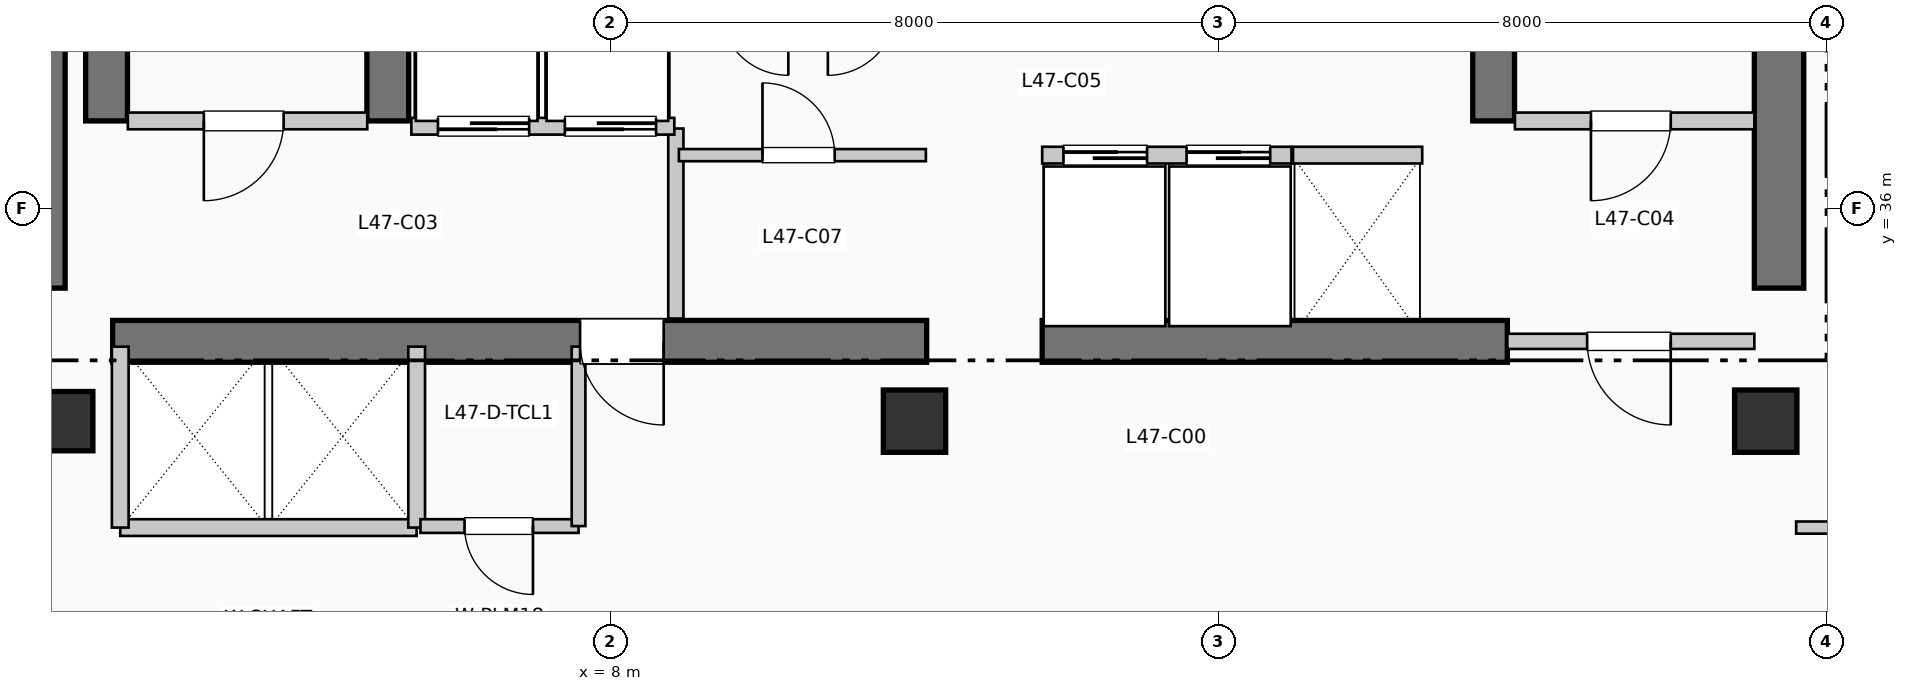
"""IFC4 building model, lengths in metres.
Left out: names, types, materials, properties, quantities, classifications, styles, units other than length and angle.
Written with IfcOpenShell. Run it as: python <this file> out.ifc"""

import sys

from ifc_helpers import new_model, si_unit, direction, frame, frame_2d, origin, origin_2d, place, context, subcontext, project, spatial, rectangle, extrude, element, fill, save


model = new_model("IFC4")
c1 = context("Model", 3, precision=1e-05, world=origin(), true_north=direction((0.0, 1.0)))
c2 = subcontext(c1, "Body", "Model", "MODEL_VIEW")
j1 = project(units=[si_unit("LENGTHUNIT", "METRE"), si_unit("PLANEANGLEUNIT", "RADIAN")], contexts=[c1])
p1 = place(None, origin())
s1 = spatial("IfcSite", under=j1, at=p1, CompositionType="ELEMENT")
p2 = place(p1, origin())
s2 = spatial("IfcBuilding", under=s1, at=p2, CompositionType="ELEMENT")
p3 = place(p2, frame((0.0, 0.0, 195.36)))
s3 = spatial("IfcBuildingStorey", under=s2, at=p3, CompositionType="ELEMENT", Elevation=195.36)
p4 = place(p3, frame((0.5, 34.95, 0.0), z_axis=(0.0, 0.0, 1.0), x_axis=(0.0, 1.0, 0.0)))
e1 = element("IfcWall", 1, at=p4, inside=s3, PredefinedType="SHEAR", context=c2, shape_type="SweptSolid", body=[
    extrude(rectangle(XDim=7.9, YDim=0.65, at=frame_2d((3.95, 0.0))), origin(), (0.0, 0.0, 1.0), 3.96),
])
p5 = place(p3, frame((23.375, 34.95, 0.0), z_axis=(0.0, 0.0, 1.0), x_axis=(0.0, 1.0, 0.0)))
e2 = element("IfcWall", 2, at=p5, inside=s3, PredefinedType="SHEAR", context=c2, shape_type="SweptSolid", body=[
    extrude(rectangle(XDim=10.64, YDim=0.65, at=frame_2d((5.32, 0.0))), origin(), (0.0, 0.0, 1.0), 3.96),
])
p6 = place(p3, frame((1.45, 34.25, 0.0), z_axis=(0.0, 0.0, 1.0), x_axis=(1.0, 0.0, 0.0)))
e3 = element("IfcWall", 3, at=p6, inside=s3, PredefinedType="SHEAR", context=c2, shape_type="SweptSolid", body=[
    extrude(rectangle(XDim=10.71, YDim=0.55, at=frame_2d((5.355, 0.0))), origin(), (0.0, 0.0, 1.0), 3.96),
])
p7 = place(p6, frame((7.25, 0.0, 0.0), z_axis=(0.0, 0.0, 1.0), x_axis=(-1.0, 0.0, 0.0)))
e4 = element("IfcOpeningElement", 4, at=p7, cuts=e3, PredefinedType="OPENING", context=c2, shape_type="SweptSolid", body=[
    extrude(rectangle(XDim=1.1, YDim=2.15, at=frame_2d((0.55, 1.075))), frame((0.0, 0.285, 0.0), z_axis=(0.0, -1.0, 0.0), x_axis=(1.0, 0.0, 0.0)), (0.0, 0.0, 1.0), 0.57),
])
p8 = place(p3, frame((13.68, 34.25, 0.0), z_axis=(0.0, 0.0, 1.0), x_axis=(1.0, 0.0, 0.0)))
e5 = element("IfcWall", 5, at=p8, inside=s3, PredefinedType="SHEAR", context=c2, shape_type="SweptSolid", body=[
    extrude(rectangle(XDim=6.12, YDim=0.55, at=frame_2d((3.06, 0.0))), origin(), (0.0, 0.0, 1.0), 3.96),
])
for number, where, z_axis, x_axis in (
    (6, (1.37, 37.15, 0.0), (0.0, 0.0, 1.0), (0.0, 1.0, 0.0)),
    (7, (5.07, 37.15, 0.0), (0.0, 0.0, 1.0), (0.0, 1.0, 0.0)),
    (8, (19.62, 37.15, 0.0), (0.0, 0.0, 1.0), (0.0, 1.0, 0.0)),
):
    element("IfcWall", number, at=place(p3, frame(where, z_axis=z_axis, x_axis=x_axis)), inside=s3, PredefinedType="SHEAR", context=c2, shape_type="SweptSolid", body=[
        extrude(rectangle(XDim=7.89, YDim=0.55, at=frame_2d((3.945, 0.0))), origin(), (0.0, 0.0, 1.0), 3.96),
    ])
p9 = place(p3, frame((0.8, 33.2, 0.0), z_axis=(0.0, 0.0, 1.0), x_axis=(1.0, 0.0, 0.0)))
e9 = element("IfcColumn", 9, at=p9, inside=s3, PredefinedType="COLUMN", context=c2, shape_type="SweptSolid", body=[
    extrude(rectangle(XDim=0.78, YDim=0.78, at=origin_2d()), origin(), (0.0, 0.0, 1.0), 3.96),
])
for number, where, z_axis, x_axis in (
    (10, (12.0, 33.2, 0.0), (0.0, 0.0, 1.0), (1.0, 0.0, 0.0)),
    (11, (23.2, 33.2, 0.0), (0.0, 0.0, 1.0), (1.0, 0.0, 0.0)),
):
    element("IfcColumn", number, at=place(p3, frame(where, z_axis=z_axis, x_axis=x_axis)), inside=s3, PredefinedType="COLUMN", context=c2, shape_type="SweptSolid", body=[
        extrude(rectangle(XDim=0.82, YDim=0.82, at=origin_2d()), origin(), (0.0, 0.0, 1.0), 3.96),
    ])
p10 = place(p3, frame((1.65, 37.15, 0.0), z_axis=(0.0, 0.0, 1.0), x_axis=(1.0, 0.0, 0.0)))
e12 = element("IfcWall", 12, at=p10, inside=s3, PredefinedType="PARTITIONING", context=c2, shape_type="SweptSolid", body=[
    extrude(rectangle(XDim=3.15, YDim=0.22, at=frame_2d((1.575, 0.0))), origin(), (0.0, 0.0, 1.0), 3.71),
])
p11 = place(p10, frame((2.05, 0.0, 0.0), z_axis=(0.0, 0.0, 1.0), x_axis=(-1.0, 0.0, 0.0)))
e13 = element("IfcOpeningElement", 13, at=p11, cuts=e12, PredefinedType="OPENING", context=c2, shape_type="SweptSolid", body=[
    extrude(rectangle(XDim=1.05, YDim=2.15, at=frame_2d((0.525, 1.075))), frame((0.0, 0.12, 0.0), z_axis=(0.0, -1.0, 0.0), x_axis=(1.0, 0.0, 0.0)), (0.0, 0.0, 1.0), 0.24),
])
p12 = place(p3, frame((8.86, 34.55, 0.0), z_axis=(0.0, 0.0, 1.0), x_axis=(0.0, 1.0, 0.0)))
e14 = element("IfcWall", 14, at=p12, inside=s3, PredefinedType="PARTITIONING", context=c2, shape_type="SweptSolid", body=[
    extrude(rectangle(XDim=2.5, YDim=0.2, at=frame_2d((1.25, 0.0))), origin(), (0.0, 0.0, 1.0), 3.71),
])
p13 = place(p3, frame((19.9, 37.15, 0.0), z_axis=(0.0, 0.0, 1.0), x_axis=(1.0, 0.0, 0.0)))
e15 = element("IfcWall", 15, at=p13, inside=s3, PredefinedType="PARTITIONING", context=c2, shape_type="SweptSolid", body=[
    extrude(rectangle(XDim=3.15, YDim=0.22, at=frame_2d((1.575, 0.0))), origin(), (0.0, 0.0, 1.0), 3.71),
])
p14 = place(p13, frame((2.05, 0.0, 0.0), z_axis=(0.0, 0.0, 1.0), x_axis=(-1.0, 0.0, 0.0)))
e16 = element("IfcOpeningElement", 16, at=p14, cuts=e15, PredefinedType="OPENING", context=c2, shape_type="SweptSolid", body=[
    extrude(rectangle(XDim=1.05, YDim=2.15, at=frame_2d((0.525, 1.075))), frame((0.0, 0.12, 0.0), z_axis=(0.0, -1.0, 0.0), x_axis=(1.0, 0.0, 0.0)), (0.0, 0.0, 1.0), 0.24),
])
p15 = place(p3, frame((19.8, 34.25, 0.0), z_axis=(0.0, 0.0, 1.0), x_axis=(1.0, 0.0, 0.0)))
e17 = element("IfcWall", 17, at=p15, inside=s3, PredefinedType="PARTITIONING", context=c2, shape_type="SweptSolid", body=[
    extrude(rectangle(XDim=3.25, YDim=0.2, at=frame_2d((1.625, 0.0))), origin(), (0.0, 0.0, 1.0), 3.71),
])
p16 = place(p15, frame((2.15, 0.0, 0.0), z_axis=(0.0, 0.0, 1.0), x_axis=(-1.0, 0.0, 0.0)))
e18 = element("IfcOpeningElement", 18, at=p16, cuts=e17, PredefinedType="OPENING", context=c2, shape_type="SweptSolid", body=[
    extrude(rectangle(XDim=1.1, YDim=2.15, at=frame_2d((0.55, 1.075))), frame((0.0, 0.11, 0.0), z_axis=(0.0, -1.0, 0.0), x_axis=(1.0, 0.0, 0.0)), (0.0, 0.0, 1.0), 0.22),
])
p17 = place(p3, frame((5.38, 37.08, 0.0), z_axis=(0.0, 0.0, 1.0), x_axis=(1.0, 0.0, 0.0)))
e19 = element("IfcWall", 19, at=p17, inside=s3, PredefinedType="PARTITIONING", context=c2, shape_type="SweptSolid", body=[
    extrude(rectangle(XDim=3.46, YDim=0.22, at=frame_2d((1.73, 0.0))), origin(), (0.0, 0.0, 1.0), 3.71),
])
p18 = place(p17, frame((1.55, 0.0, 0.0), z_axis=(0.0, 0.0, 1.0), x_axis=(-1.0, 0.0, 0.0)))
e20 = element("IfcOpeningElement", 20, at=p18, cuts=e19, PredefinedType="OPENING", context=c2, shape_type="SweptSolid", body=[
    extrude(rectangle(XDim=1.2, YDim=2.2, at=frame_2d((0.6, 1.1))), frame((0.0, 0.12, 0.0), z_axis=(0.0, -1.0, 0.0), x_axis=(1.0, 0.0, 0.0)), (0.0, 0.0, 1.0), 0.24),
])
p19 = place(p17, frame((3.22, 0.0, 0.0), z_axis=(0.0, 0.0, 1.0), x_axis=(-1.0, 0.0, 0.0)))
e21 = element("IfcOpeningElement", 21, at=p19, cuts=e19, PredefinedType="OPENING", context=c2, shape_type="SweptSolid", body=[
    extrude(rectangle(XDim=1.2, YDim=2.2, at=frame_2d((0.6, 1.1))), frame((0.0, 0.12, 0.0), z_axis=(0.0, -1.0, 0.0), x_axis=(1.0, 0.0, 0.0)), (0.0, 0.0, 1.0), 0.24),
])
p20 = place(p3, frame((1.55, 31.8, 0.0), z_axis=(0.0, 0.0, 1.0), x_axis=(1.0, 0.0, 0.0)))
e22 = element("IfcWall", 22, at=p20, inside=s3, PredefinedType="PARTITIONING", context=c2, shape_type="SweptSolid", body=[
    extrude(rectangle(XDim=3.9, YDim=0.22, at=frame_2d((1.95, 0.0))), origin(), (0.0, 0.0, 1.0), 3.71),
])
for number, where, z_axis, x_axis in (
    (23, (1.55, 31.8, 0.0), (0.0, 0.0, 1.0), (0.0, 1.0, 0.0)),
    (24, (5.45, 31.8, 0.0), (0.0, 0.0, 1.0), (0.0, 1.0, 0.0)),
):
    element("IfcWall", number, at=place(p3, frame(where, z_axis=z_axis, x_axis=x_axis)), inside=s3, PredefinedType="PARTITIONING", context=c2, shape_type="SweptSolid", body=[
        extrude(rectangle(XDim=2.38, YDim=0.22, at=frame_2d((1.19, 0.0))), origin(), (0.0, 0.0, 1.0), 3.71),
    ])
p21 = place(p3, frame((5.5, 31.82, 0.0), z_axis=(0.0, 0.0, 1.0), x_axis=(1.0, 0.0, 0.0)))
e25 = element("IfcWall", 25, at=p21, inside=s3, PredefinedType="PLUMBINGWALL", context=c2, shape_type="SweptSolid", body=[
    extrude(rectangle(XDim=2.08, YDim=0.18, at=frame_2d((1.04, 0.0))), origin(), (0.0, 0.0, 1.0), 3.71),
])
p22 = place(p21, frame((1.48, 0.0, 0.0), z_axis=(0.0, 0.0, 1.0), x_axis=(-1.0, 0.0, 0.0)))
e26 = element("IfcOpeningElement", 26, at=p22, cuts=e25, PredefinedType="OPENING", context=c2, shape_type="SweptSolid", body=[
    extrude(rectangle(XDim=0.9, YDim=2.1, at=frame_2d((0.45, 1.05))), frame((0.0, 0.1, 0.0), z_axis=(0.0, -1.0, 0.0), x_axis=(1.0, 0.0, 0.0)), (0.0, 0.0, 1.0), 0.2),
])
p23 = place(p3, frame((7.58, 31.82, 0.0), z_axis=(0.0, 0.0, 1.0), x_axis=(0.0, 1.0, 0.0)))
e27 = element("IfcWall", 27, at=p23, inside=s3, PredefinedType="PLUMBINGWALL", context=c2, shape_type="SweptSolid", body=[
    extrude(rectangle(XDim=2.36, YDim=0.18, at=frame_2d((1.18, 0.0))), origin(), (0.0, 0.0, 1.0), 3.71),
])
p24 = place(p3, frame((8.9, 36.7, 0.0), z_axis=(0.0, 0.0, 1.0), x_axis=(1.0, 0.0, 0.0)))
e28 = element("IfcWall", 28, at=p24, inside=s3, PredefinedType="PARTITIONING", context=c2, shape_type="SweptSolid", body=[
    extrude(rectangle(XDim=3.25, YDim=0.16, at=frame_2d((1.625, 0.0))), origin(), (0.0, 0.0, 1.0), 3.71),
])
p25 = place(p24, frame((1.1, 0.0, 0.0)))
e29 = element("IfcOpeningElement", 29, at=p25, cuts=e28, PredefinedType="OPENING", context=c2, shape_type="SweptSolid", body=[
    extrude(rectangle(XDim=0.95, YDim=2.15, at=frame_2d((0.475, 1.075))), frame((0.0, 0.09, 0.0), z_axis=(0.0, -1.0, 0.0), x_axis=(1.0, 0.0, 0.0)), (0.0, 0.0, 1.0), 0.18),
])
p26 = place(p3, frame((13.68, 36.7, 0.0), z_axis=(0.0, 0.0, 1.0), x_axis=(1.0, 0.0, 0.0)))
e30 = element("IfcWall", 30, at=p26, inside=s3, PredefinedType="PARTITIONING", context=c2, shape_type="SweptSolid", body=[
    extrude(rectangle(XDim=3.28, YDim=0.22, at=frame_2d((1.64, 0.0))), origin(), (0.0, 0.0, 1.0), 3.71),
])
p27 = place(p26, frame((0.28, 0.0, 0.0)))
e31 = element("IfcOpeningElement", 31, at=p27, cuts=e30, PredefinedType="OPENING", context=c2, shape_type="SweptSolid", body=[
    extrude(rectangle(XDim=1.1, YDim=2.2, at=frame_2d((0.55, 1.1))), frame((0.0, 0.12, 0.0), z_axis=(0.0, -1.0, 0.0), x_axis=(1.0, 0.0, 0.0)), (0.0, 0.0, 1.0), 0.24),
])
p28 = place(p26, frame((1.9, 0.0, 0.0)))
e32 = element("IfcOpeningElement", 32, at=p28, cuts=e30, PredefinedType="OPENING", context=c2, shape_type="SweptSolid", body=[
    extrude(rectangle(XDim=1.1, YDim=2.2, at=frame_2d((0.55, 1.1))), frame((0.0, 0.12, 0.0), z_axis=(0.0, -1.0, 0.0), x_axis=(1.0, 0.0, 0.0)), (0.0, 0.0, 1.0), 0.24),
])
p29 = place(p3, frame((16.98, 36.7, 0.0), z_axis=(0.0, 0.0, 1.0), x_axis=(1.0, 0.0, 0.0)))
e33 = element("IfcWall", 33, at=p29, inside=s3, PredefinedType="PARTITIONING", context=c2, shape_type="SweptSolid", body=[
    extrude(rectangle(XDim=1.7, YDim=0.22, at=frame_2d((0.85, 0.0))), origin(), (0.0, 0.0, 1.0), 3.71),
])
p30 = place(p3, frame((23.6, 31.8, 0.0), z_axis=(0.0, 0.0, 1.0), x_axis=(1.0, 0.0, 0.0)))
e34 = element("IfcWall", 34, at=p30, inside=s3, PredefinedType="PARTITIONING", context=c2, shape_type="SweptSolid", body=[
    extrude(rectangle(XDim=26.41, YDim=0.16, at=frame_2d((13.205, 0.0))), origin(), (0.0, 0.0, 1.0), 3.71),
])
p31 = place(p30, frame((12.73, 0.0, 0.0)))
e35 = element("IfcOpeningElement", 35, at=p31, cuts=e34, PredefinedType="OPENING", context=c2, shape_type="SweptSolid", body=[
    extrude(rectangle(XDim=0.95, YDim=2.15, at=frame_2d((0.475, 1.075))), frame((0.0, 0.09, 0.0), z_axis=(0.0, -1.0, 0.0), x_axis=(1.0, 0.0, 0.0)), (0.0, 0.0, 1.0), 0.18),
])
p32 = place(p11, origin())
e36 = element("IfcDoor", 36, at=p32, inside=s3, OperationType="SINGLE_SWING_LEFT", PredefinedType="DOOR", context=c2, shape_type="SweptSolid", body=[
    extrude(rectangle(XDim=1.05, YDim=2.15, at=frame_2d((0.525, 1.075))), frame((0.0, 0.025, 0.0), z_axis=(0.0, -1.0, 0.0), x_axis=(1.0, 0.0, 0.0)), (0.0, 0.0, 1.0), 0.05),
])
fill(e13, e36)
p33 = place(p7, origin())
e37 = element("IfcDoor", 37, at=p33, inside=s3, OperationType="SINGLE_SWING_RIGHT", PredefinedType="DOOR", context=c2, shape_type="SweptSolid", body=[
    extrude(rectangle(XDim=1.1, YDim=2.15, at=frame_2d((0.55, 1.075))), frame((0.0, 0.025, 0.0), z_axis=(0.0, -1.0, 0.0), x_axis=(1.0, 0.0, 0.0)), (0.0, 0.0, 1.0), 0.05),
])
fill(e4, e37)
p34 = place(p14, origin())
e38 = element("IfcDoor", 38, at=p34, inside=s3, OperationType="SINGLE_SWING_LEFT", PredefinedType="DOOR", context=c2, shape_type="SweptSolid", body=[
    extrude(rectangle(XDim=1.05, YDim=2.15, at=frame_2d((0.525, 1.075))), frame((0.0, 0.025, 0.0), z_axis=(0.0, -1.0, 0.0), x_axis=(1.0, 0.0, 0.0)), (0.0, 0.0, 1.0), 0.05),
])
fill(e16, e38)
p35 = place(p16, origin())
e39 = element("IfcDoor", 39, at=p35, inside=s3, OperationType="SINGLE_SWING_RIGHT", PredefinedType="DOOR", context=c2, shape_type="SweptSolid", body=[
    extrude(rectangle(XDim=1.1, YDim=2.15, at=frame_2d((0.55, 1.075))), frame((0.0, 0.025, 0.0), z_axis=(0.0, -1.0, 0.0), x_axis=(1.0, 0.0, 0.0)), (0.0, 0.0, 1.0), 0.05),
])
fill(e18, e39)
p36 = place(p18, origin())
e40 = element("IfcDoor", 40, at=p36, inside=s3, OperationType="SLIDING_TO_RIGHT", PredefinedType="DOOR", context=c2, shape_type="SweptSolid", body=[
    extrude(rectangle(XDim=1.2, YDim=2.2, at=frame_2d((0.6, 1.1))), frame((0.0, 0.025, 0.0), z_axis=(0.0, -1.0, 0.0), x_axis=(1.0, 0.0, 0.0)), (0.0, 0.0, 1.0), 0.05),
])
fill(e20, e40)
p37 = place(p19, origin())
e41 = element("IfcDoor", 41, at=p37, inside=s3, OperationType="SLIDING_TO_RIGHT", PredefinedType="DOOR", context=c2, shape_type="SweptSolid", body=[
    extrude(rectangle(XDim=1.2, YDim=2.2, at=frame_2d((0.6, 1.1))), frame((0.0, 0.025, 0.0), z_axis=(0.0, -1.0, 0.0), x_axis=(1.0, 0.0, 0.0)), (0.0, 0.0, 1.0), 0.05),
])
fill(e21, e41)
p38 = place(p22, origin())
e42 = element("IfcDoor", 42, at=p38, inside=s3, OperationType="SINGLE_SWING_RIGHT", PredefinedType="DOOR", context=c2, shape_type="SweptSolid", body=[
    extrude(rectangle(XDim=0.9, YDim=2.1, at=frame_2d((0.45, 1.05))), frame((0.0, 0.025, 0.0), z_axis=(0.0, -1.0, 0.0), x_axis=(1.0, 0.0, 0.0)), (0.0, 0.0, 1.0), 0.05),
])
fill(e26, e42)
p39 = place(p25, origin())
e43 = element("IfcDoor", 43, at=p39, inside=s3, OperationType="SINGLE_SWING_LEFT", PredefinedType="DOOR", context=c2, shape_type="SweptSolid", body=[
    extrude(rectangle(XDim=0.95, YDim=2.15, at=frame_2d((0.475, 1.075))), frame((0.0, 0.025, 0.0), z_axis=(0.0, -1.0, 0.0), x_axis=(1.0, 0.0, 0.0)), (0.0, 0.0, 1.0), 0.05),
])
fill(e29, e43)
p40 = place(p27, origin())
e44 = element("IfcDoor", 44, at=p40, inside=s3, OperationType="SLIDING_TO_RIGHT", PredefinedType="DOOR", context=c2, shape_type="SweptSolid", body=[
    extrude(rectangle(XDim=1.1, YDim=2.2, at=frame_2d((0.55, 1.1))), frame((0.0, 0.025, 0.0), z_axis=(0.0, -1.0, 0.0), x_axis=(1.0, 0.0, 0.0)), (0.0, 0.0, 1.0), 0.05),
])
fill(e31, e44)
p41 = place(p28, origin())
e45 = element("IfcDoor", 45, at=p41, inside=s3, OperationType="SLIDING_TO_RIGHT", PredefinedType="DOOR", context=c2, shape_type="SweptSolid", body=[
    extrude(rectangle(XDim=1.1, YDim=2.2, at=frame_2d((0.55, 1.1))), frame((0.0, 0.025, 0.0), z_axis=(0.0, -1.0, 0.0), x_axis=(1.0, 0.0, 0.0)), (0.0, 0.0, 1.0), 0.05),
])
fill(e32, e45)
save(model, sys.argv[1])
